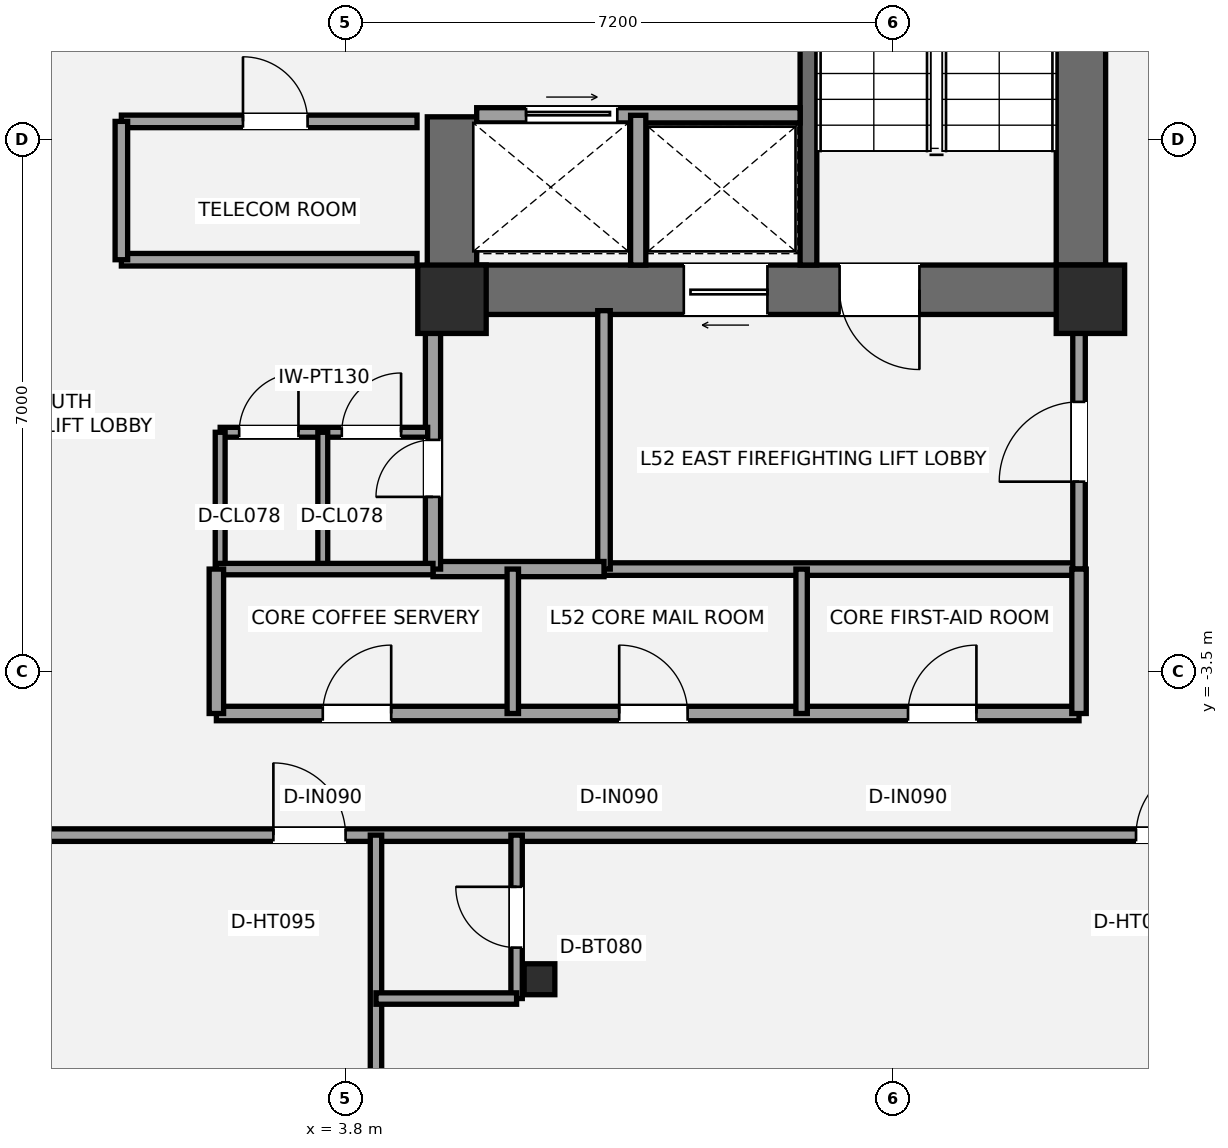
"""IFC4 building model, lengths in metres.
Left out: names, types, materials, properties, quantities, classifications, styles, units other than length and angle.
Written with IfcOpenShell. Run it as: python <this file> out.ifc"""

import sys

from ifc_helpers import new_model, si_unit, direction, frame, frame_2d, origin, origin_2d, place, context, subcontext, project, spatial, rectangle, i_section, extrude, element, fill, save


model = new_model("IFC4")
c1 = context("Model", 3, precision=1e-05, world=origin(), true_north=direction((0.0, 1.0)))
c2 = subcontext(c1, "Body", "Model", "MODEL_VIEW")
j1 = project(units=[si_unit("LENGTHUNIT", "METRE"), si_unit("PLANEANGLEUNIT", "RADIAN")], contexts=[c1])
p1 = place(None, origin())
s1 = spatial("IfcSite", under=j1, at=p1, CompositionType="ELEMENT")
p2 = place(p1, origin())
s2 = spatial("IfcBuilding", under=s1, at=p2, CompositionType="ELEMENT")
p3 = place(p2, frame((0.0, 0.0, 188.6)))
s3 = spatial("IfcBuildingStorey", under=s2, at=p3, CompositionType="ELEMENT", Elevation=188.6)
p4 = place(p3, frame((13.475, 1.2, 0.0), z_axis=(0.0, 0.0, 1.0), x_axis=(0.0, 1.0, 0.0)))
e1 = element("IfcWall", 1, at=p4, inside=s3, PredefinedType="SHEAR", context=c2, shape_type="SweptSolid", body=[
    extrude(rectangle(XDim=8.45, YDim=0.65, at=frame_2d((4.225, 0.0))), origin(), (0.0, 0.0, 1.0), 3.2),
])
p5 = place(p3, frame((13.8, 1.525, 0.0), z_axis=(0.0, 0.0, 1.0), x_axis=(-1.0, 0.0, 0.0)))
e2 = element("IfcWall", 2, at=p5, inside=s3, PredefinedType="SHEAR", context=c2, shape_type="SweptSolid", body=[
    extrude(rectangle(XDim=8.925, YDim=0.65, at=frame_2d((4.462, 0.0))), origin(), (0.0, 0.0, 1.0), 3.2),
])
p6 = place(p5, frame((2.45, 0.0, 0.0)))
e3 = element("IfcOpeningElement", 3, at=p6, cuts=e2, PredefinedType="OPENING", context=c2, shape_type="SweptSolid", body=[
    extrude(rectangle(XDim=1.05, YDim=2.15, at=frame_2d((0.525, 1.075))), frame((0.0, 0.335, 0.0), z_axis=(0.0, -1.0, 0.0), x_axis=(1.0, 0.0, 0.0)), (0.0, 0.0, 1.0), 0.67),
])
p7 = place(p5, frame((4.45, 0.0, 0.0)))
e4 = element("IfcOpeningElement", 4, at=p7, cuts=e2, PredefinedType="OPENING", context=c2, shape_type="SweptSolid", body=[
    extrude(rectangle(XDim=1.1, YDim=2.2, at=frame_2d((0.55, 1.1))), frame((0.0, 0.335, 0.0), z_axis=(0.0, -1.0, 0.0), x_axis=(1.0, 0.0, 0.0)), (0.0, 0.0, 1.0), 0.67),
])
p8 = place(p3, frame((5.2, 1.2, 0.0), z_axis=(0.0, 0.0, 1.0), x_axis=(0.0, 1.0, 0.0)))
e5 = element("IfcWall", 5, at=p8, inside=s3, PredefinedType="SHEAR", context=c2, shape_type="SweptSolid", body=[
    extrude(rectangle(XDim=2.6, YDim=0.65, at=frame_2d((1.3, 0.0))), origin(), (0.0, 0.0, 1.0), 3.2),
])
p9 = place(p3, frame((9.89, 1.85, 0.0), z_axis=(0.0, 0.0, 1.0), x_axis=(0.0, 1.0, 0.0)))
e6 = element("IfcWall", 6, at=p9, inside=s3, PredefinedType="SHEAR", context=c2, shape_type="SweptSolid", body=[
    extrude(rectangle(XDim=7.15, YDim=0.22, at=frame_2d((3.575, 0.0))), origin(), (0.0, 0.0, 1.0), 3.2),
])
for number, where, z_axis, x_axis in (
    (7, (5.2, 1.4, 0.0), (0.0, 0.0, 1.0), (1.0, 0.0, 0.0)),
    (8, (13.6, 1.4, 0.0), (0.0, 0.0, 1.0), (1.0, 0.0, 0.0)),
):
    element("IfcColumn", number, at=place(p3, frame(where, z_axis=z_axis, x_axis=x_axis)), inside=s3, PredefinedType="COLUMN", context=c2, shape_type="SweptSolid", body=[
        extrude(rectangle(XDim=0.9, YDim=0.9, at=origin_2d()), origin(), (0.0, 0.0, 1.0), 3.2),
    ])
p10 = place(p3, frame((6.351, -7.546, 0.0), z_axis=(0.0, 0.0, 1.0), x_axis=(1.0, 0.0, 0.0)))
e9 = element("IfcColumn", 9, at=p10, inside=s3, PredefinedType="COLUMN", context=c2, shape_type="SweptSolid", body=[
    extrude(i_section(OverallWidth=0.404, OverallDepth=0.407, WebThickness=0.027, FlangeThickness=0.044, at=origin_2d()), origin(), (0.0, 0.0, 1.0), 3.2),
])
p11 = place(p3, frame((7.2, -2.15, 0.0), z_axis=(0.0, 0.0, 1.0), x_axis=(1.0, 0.0, 0.0)))
e10 = element("IfcWall", 10, at=p11, inside=s3, PredefinedType="PARTITIONING", context=c2, shape_type="SweptSolid", body=[
    extrude(rectangle(XDim=6.25, YDim=0.165, at=frame_2d((3.125, 0.0))), origin(), (0.0, 0.0, 1.0), 3.02),
])
p12 = place(p3, frame((7.2, -2.15, 0.0), z_axis=(0.0, 0.0, 1.0), x_axis=(0.0, 1.0, 0.0)))
e11 = element("IfcWall", 11, at=p12, inside=s3, PredefinedType="PARTITIONING", context=c2, shape_type="SweptSolid", body=[
    extrude(rectangle(XDim=3.4, YDim=0.165, at=frame_2d((1.7, 0.0))), origin(), (0.0, 0.0, 1.0), 2.473),
])
p13 = place(p3, frame((13.45, -2.15, 0.0), z_axis=(0.0, 0.0, 1.0), x_axis=(0.0, 1.0, 0.0)))
e12 = element("IfcWall", 12, at=p13, inside=s3, PredefinedType="PARTITIONING", context=c2, shape_type="SweptSolid", body=[
    extrude(rectangle(XDim=3.4, YDim=0.165, at=frame_2d((1.7, 0.0))), origin(), (0.0, 0.0, 1.0), 2.473),
])
p14 = place(p13, frame((1.15, 0.0, 0.0)))
e13 = element("IfcOpeningElement", 13, at=p14, cuts=e12, PredefinedType="OPENING", context=c2, shape_type="SweptSolid", body=[
    extrude(rectangle(XDim=1.05, YDim=2.15, at=frame_2d((0.525, 1.075))), frame((0.0, 0.093, 0.0), z_axis=(0.0, -1.0, 0.0), x_axis=(1.0, 0.0, 0.0)), (0.0, 0.0, 1.0), 0.185),
])
p15 = place(p3, frame((4.95, -2.15, 0.0), z_axis=(0.0, 0.0, 1.0), x_axis=(1.0, 0.0, 0.0)))
e14 = element("IfcWall", 14, at=p15, inside=s3, PredefinedType="SOLIDWALL", context=c2, shape_type="SweptSolid", body=[
    extrude(rectangle(XDim=2.25, YDim=0.2, at=frame_2d((1.125, 0.0))), origin(), (0.0, 0.0, 1.0), 3.02),
])
p16 = place(p3, frame((4.95, -2.15, 0.0), z_axis=(0.0, 0.0, 1.0), x_axis=(0.0, 1.0, 0.0)))
e15 = element("IfcWall", 15, at=p16, inside=s3, PredefinedType="SOLIDWALL", context=c2, shape_type="SweptSolid", body=[
    extrude(rectangle(XDim=3.4, YDim=0.2, at=frame_2d((1.7, 0.0))), origin(), (0.0, 0.0, 1.0), 2.473),
])
p17 = place(p16, frame((0.95, 0.0, 0.0)))
e16 = element("IfcOpeningElement", 16, at=p17, cuts=e15, PredefinedType="OPENING", context=c2, shape_type="SweptSolid", body=[
    extrude(rectangle(XDim=0.75, YDim=2.1, at=frame_2d((0.375, 1.05))), frame((0.0, 0.11, 0.0), z_axis=(0.0, -1.0, 0.0), x_axis=(1.0, 0.0, 0.0)), (0.0, 0.0, 1.0), 0.22),
])
p18 = place(p3, frame((2.15, -0.35, 0.0), z_axis=(0.0, 0.0, 1.0), x_axis=(1.0, 0.0, 0.0)))
e17 = element("IfcWall", 17, at=p18, inside=s3, PredefinedType="PARTITIONING", context=c2, shape_type="SweptSolid", body=[
    extrude(rectangle(XDim=2.73, YDim=0.13, at=frame_2d((1.365, 0.0))), origin(), (0.0, 0.0, 1.0), 3.02),
])
p19 = place(p18, frame((0.25, 0.0, 0.0)))
e18 = element("IfcOpeningElement", 18, at=p19, cuts=e17, PredefinedType="OPENING", context=c2, shape_type="SweptSolid", body=[
    extrude(rectangle(XDim=0.78, YDim=2.1, at=frame_2d((0.39, 1.05))), frame((0.0, 0.075, 0.0), z_axis=(0.0, -1.0, 0.0), x_axis=(1.0, 0.0, 0.0)), (0.0, 0.0, 1.0), 0.15),
])
p20 = place(p18, frame((1.6, 0.0, 0.0)))
e19 = element("IfcOpeningElement", 19, at=p20, cuts=e17, PredefinedType="OPENING", context=c2, shape_type="SweptSolid", body=[
    extrude(rectangle(XDim=0.78, YDim=2.1, at=frame_2d((0.39, 1.05))), frame((0.0, 0.075, 0.0), z_axis=(0.0, -1.0, 0.0), x_axis=(1.0, 0.0, 0.0)), (0.0, 0.0, 1.0), 0.15),
])
for number, where, z_axis, x_axis in (
    (20, (2.15, -2.15, 0.0), (0.0, 0.0, 1.0), (0.0, 1.0, 0.0)),
    (21, (3.5, -2.15, 0.0), (0.0, 0.0, 1.0), (0.0, 1.0, 0.0)),
):
    element("IfcWall", number, at=place(p3, frame(where, z_axis=z_axis, x_axis=x_axis)), inside=s3, PredefinedType="PARTITIONING", context=c2, shape_type="SweptSolid", body=[
        extrude(rectangle(XDim=1.8, YDim=0.13, at=frame_2d((0.9, 0.0))), origin(), (0.0, 0.0, 1.0), 3.02),
    ])
p21 = place(p3, frame((5.525, 3.82, 0.0), z_axis=(0.0, 0.0, 1.0), x_axis=(1.0, 0.0, 0.0)))
e22 = element("IfcWall", 22, at=p21, inside=s3, PredefinedType="SOLIDWALL", context=c2, shape_type="SweptSolid", body=[
    extrude(rectangle(XDim=4.255, YDim=0.2, at=frame_2d((2.127, 0.0))), origin(), (0.0, 0.0, 1.0), 3.02),
])
p22 = place(p21, frame((0.65, 0.0, 0.0)))
e23 = element("IfcOpeningElement", 23, at=p22, cuts=e22, PredefinedType="OPENING", context=c2, shape_type="SweptSolid", body=[
    extrude(rectangle(XDim=1.2, YDim=2.2, at=frame_2d((0.6, 1.1))), frame((0.0, 0.11, 0.0), z_axis=(0.0, -1.0, 0.0), x_axis=(1.0, 0.0, 0.0)), (0.0, 0.0, 1.0), 0.22),
])
p23 = place(p3, frame((7.65, 1.85, 0.0), z_axis=(0.0, 0.0, 1.0), x_axis=(0.0, 1.0, 0.0)))
e24 = element("IfcWall", 24, at=p23, inside=s3, PredefinedType="SOLIDWALL", context=c2, shape_type="SweptSolid", body=[
    extrude(rectangle(XDim=1.97, YDim=0.2, at=frame_2d((0.985, 0.0))), origin(), (0.0, 0.0, 1.0), 3.02),
])
p24 = place(p3, frame((0.85, 1.92, 0.0), z_axis=(0.0, 0.0, 1.0), x_axis=(1.0, 0.0, 0.0)))
e25 = element("IfcWall", 25, at=p24, inside=s3, PredefinedType="PARTITIONING", context=c2, shape_type="SweptSolid", body=[
    extrude(rectangle(XDim=3.89, YDim=0.165, at=frame_2d((1.945, 0.0))), origin(), (0.0, 0.0, 1.0), 2.16),
])
p25 = place(p3, frame((0.85, 3.74, 0.0), z_axis=(0.0, 0.0, 1.0), x_axis=(1.0, 0.0, 0.0)))
e26 = element("IfcWall", 26, at=p25, inside=s3, PredefinedType="PARTITIONING", context=c2, shape_type="SweptSolid", body=[
    extrude(rectangle(XDim=3.89, YDim=0.165, at=frame_2d((1.945, 0.0))), origin(), (0.0, 0.0, 1.0), 3.02),
])
p26 = place(p25, frame((1.6, 0.0, 0.0)))
e27 = element("IfcOpeningElement", 27, at=p26, cuts=e26, PredefinedType="OPENING", context=c2, shape_type="SweptSolid", body=[
    extrude(rectangle(XDim=0.85, YDim=2.1, at=frame_2d((0.425, 1.05))), frame((0.0, 0.093, 0.0), z_axis=(0.0, -1.0, 0.0), x_axis=(1.0, 0.0, 0.0)), (0.0, 0.0, 1.0), 0.185),
])
p27 = place(p3, frame((0.85, 1.92, 0.0), z_axis=(0.0, 0.0, 1.0), x_axis=(0.0, 1.0, 0.0)))
e28 = element("IfcWall", 28, at=p27, inside=s3, PredefinedType="PARTITIONING", context=c2, shape_type="SweptSolid", body=[
    extrude(rectangle(XDim=1.82, YDim=0.165, at=frame_2d((0.91, 0.0))), origin(), (0.0, 0.0, 1.0), 3.02),
])
p28 = place(p3, frame((2.1, -4.05, 0.0), z_axis=(0.0, 0.0, 1.0), x_axis=(1.0, 0.0, 0.0)))
e29 = element("IfcWall", 29, at=p28, inside=s3, PredefinedType="PLUMBINGWALL", context=c2, shape_type="SweptSolid", body=[
    extrude(rectangle(XDim=11.35, YDim=0.19, at=frame_2d((5.675, 0.0))), origin(), (0.0, 0.0, 1.0), 2.555),
])
p29 = place(p28, frame((1.4, 0.0, 0.0)))
e30 = element("IfcOpeningElement", 30, at=p29, cuts=e29, PredefinedType="OPENING", context=c2, shape_type="SweptSolid", body=[
    extrude(rectangle(XDim=0.9, YDim=2.1, at=frame_2d((0.45, 1.05))), frame((0.0, 0.105, 0.0), z_axis=(0.0, -1.0, 0.0), x_axis=(1.0, 0.0, 0.0)), (0.0, 0.0, 1.0), 0.21),
])
p30 = place(p28, frame((5.3, 0.0, 0.0)))
e31 = element("IfcOpeningElement", 31, at=p30, cuts=e29, PredefinedType="OPENING", context=c2, shape_type="SweptSolid", body=[
    extrude(rectangle(XDim=0.9, YDim=2.1, at=frame_2d((0.45, 1.05))), frame((0.0, 0.105, 0.0), z_axis=(0.0, -1.0, 0.0), x_axis=(1.0, 0.0, 0.0)), (0.0, 0.0, 1.0), 0.21),
])
p31 = place(p28, frame((9.1, 0.0, 0.0)))
e32 = element("IfcOpeningElement", 32, at=p31, cuts=e29, PredefinedType="OPENING", context=c2, shape_type="SweptSolid", body=[
    extrude(rectangle(XDim=0.9, YDim=2.1, at=frame_2d((0.45, 1.05))), frame((0.0, 0.105, 0.0), z_axis=(0.0, -1.0, 0.0), x_axis=(1.0, 0.0, 0.0)), (0.0, 0.0, 1.0), 0.21),
])
p32 = place(p3, frame((2.1, -2.15, 0.0), z_axis=(0.0, 0.0, 1.0), x_axis=(1.0, 0.0, 0.0)))
e33 = element("IfcWall", 33, at=p32, inside=s3, PredefinedType="PLUMBINGWALL", context=c2, shape_type="SweptSolid", body=[
    extrude(rectangle(XDim=2.85, YDim=0.15, at=frame_2d((1.425, 0.0))), origin(), (0.0, 0.0, 1.0), 3.02),
])
p33 = place(p3, frame((2.1, -4.05, 0.0), z_axis=(0.0, 0.0, 1.0), x_axis=(0.0, 1.0, 0.0)))
e34 = element("IfcWall", 34, at=p33, inside=s3, PredefinedType="PLUMBINGWALL", context=c2, shape_type="SweptSolid", body=[
    extrude(rectangle(XDim=1.9, YDim=0.19, at=frame_2d((0.95, 0.0))), origin(), (0.0, 0.0, 1.0), 3.02),
])
p34 = place(p3, frame((13.45, -4.05, 0.0), z_axis=(0.0, 0.0, 1.0), x_axis=(0.0, 1.0, 0.0)))
e35 = element("IfcWall", 35, at=p34, inside=s3, PredefinedType="PLUMBINGWALL", context=c2, shape_type="SweptSolid", body=[
    extrude(rectangle(XDim=1.9, YDim=0.19, at=frame_2d((0.95, 0.0))), origin(), (0.0, 0.0, 1.0), 2.473),
])
for number, where, z_axis, x_axis in (
    (36, (6.0, -4.05, 0.0), (0.0, 0.0, 1.0), (0.0, 1.0, 0.0)),
    (37, (9.8, -4.05, 0.0), (0.0, 0.0, 1.0), (0.0, 1.0, 0.0)),
):
    element("IfcWall", number, at=place(p3, frame(where, z_axis=z_axis, x_axis=x_axis)), inside=s3, PredefinedType="PLUMBINGWALL", context=c2, shape_type="SweptSolid", body=[
        extrude(rectangle(XDim=1.9, YDim=0.15, at=frame_2d((0.95, 0.0))), origin(), (0.0, 0.0, 1.0), 2.473),
    ])
p35 = place(p3, frame((-16.1, -5.65, 0.0), z_axis=(0.0, 0.0, 1.0), x_axis=(1.0, 0.0, 0.0)))
e38 = element("IfcWall", 38, at=p35, inside=s3, PredefinedType="PARTITIONING", context=c2, shape_type="SweptSolid", body=[
    extrude(rectangle(XDim=31.65, YDim=0.165, at=frame_2d((15.825, 0.0))), origin(), (0.0, 0.0, 1.0), 2.398),
])
p36 = place(p35, frame((8.95, 0.0, 0.0)))
e39 = element("IfcOpeningElement", 39, at=p36, cuts=e38, PredefinedType="OPENING", context=c2, shape_type="SweptSolid", body=[
    extrude(rectangle(XDim=0.95, YDim=2.15, at=frame_2d((0.475, 1.075))), frame((0.0, 0.093, 0.0), z_axis=(0.0, -1.0, 0.0), x_axis=(1.0, 0.0, 0.0)), (0.0, 0.0, 1.0), 0.185),
])
p37 = place(p35, frame((18.95, 0.0, 0.0)))
e40 = element("IfcOpeningElement", 40, at=p37, cuts=e38, PredefinedType="OPENING", context=c2, shape_type="SweptSolid", body=[
    extrude(rectangle(XDim=0.95, YDim=2.15, at=frame_2d((0.475, 1.075))), frame((0.0, 0.093, 0.0), z_axis=(0.0, -1.0, 0.0), x_axis=(1.0, 0.0, 0.0)), (0.0, 0.0, 1.0), 0.185),
])
p38 = place(p35, frame((30.3, 0.0, 0.0)))
e41 = element("IfcOpeningElement", 41, at=p38, cuts=e38, PredefinedType="OPENING", context=c2, shape_type="SweptSolid", body=[
    extrude(rectangle(XDim=0.95, YDim=2.15, at=frame_2d((0.475, 1.075))), frame((0.0, 0.093, 0.0), z_axis=(0.0, -1.0, 0.0), x_axis=(1.0, 0.0, 0.0)), (0.0, 0.0, 1.0), 0.185),
])
p39 = place(p3, frame((4.2, -15.89, 0.0), z_axis=(0.0, 0.0, 1.0), x_axis=(0.0, 1.0, 0.0)))
e42 = element("IfcWall", 42, at=p39, inside=s3, PredefinedType="PLUMBINGWALL", context=c2, shape_type="SweptSolid", body=[
    extrude(rectangle(XDim=10.24, YDim=0.15, at=frame_2d((5.12, 0.0))), origin(), (0.0, 0.0, 1.0), 2.473),
])
p40 = place(p3, frame((6.05, -7.8, 0.0), z_axis=(0.0, 0.0, 1.0), x_axis=(0.0, 1.0, 0.0)))
e43 = element("IfcWall", 43, at=p40, inside=s3, PredefinedType="PLUMBINGWALL", context=c2, shape_type="SweptSolid", body=[
    extrude(rectangle(XDim=2.15, YDim=0.15, at=frame_2d((1.075, 0.0))), origin(), (0.0, 0.0, 1.0), 2.473),
])
p41 = place(p40, frame((0.67, 0.0, 0.0)))
e44 = element("IfcOpeningElement", 44, at=p41, cuts=e43, PredefinedType="OPENING", context=c2, shape_type="SweptSolid", body=[
    extrude(rectangle(XDim=0.8, YDim=2.1, at=frame_2d((0.4, 1.05))), frame((0.0, 0.085, 0.0), z_axis=(0.0, -1.0, 0.0), x_axis=(1.0, 0.0, 0.0)), (0.0, 0.0, 1.0), 0.17),
])
p42 = place(p3, frame((4.2, -7.8, 0.0), z_axis=(0.0, 0.0, 1.0), x_axis=(1.0, 0.0, 0.0)))
e45 = element("IfcWall", 45, at=p42, inside=s3, PredefinedType="PLUMBINGWALL", context=c2, shape_type="SweptSolid", body=[
    extrude(rectangle(XDim=1.85, YDim=0.15, at=frame_2d((0.925, 0.0))), origin(), (0.0, 0.0, 1.0), 3.02),
])
p43 = place(p6, origin())
e46 = element("IfcDoor", 46, at=p43, inside=s3, OperationType="SINGLE_SWING_LEFT", PredefinedType="DOOR", context=c2, shape_type="SweptSolid", body=[
    extrude(rectangle(XDim=1.05, YDim=2.15, at=frame_2d((0.525, 1.075))), frame((0.0, 0.025, 0.0), z_axis=(0.0, -1.0, 0.0), x_axis=(1.0, 0.0, 0.0)), (0.0, 0.0, 1.0), 0.05),
])
fill(e3, e46)
p44 = place(p14, origin())
e47 = element("IfcDoor", 47, at=p44, inside=s3, OperationType="SINGLE_SWING_LEFT", PredefinedType="DOOR", context=c2, shape_type="SweptSolid", body=[
    extrude(rectangle(XDim=1.05, YDim=2.15, at=frame_2d((0.525, 1.075))), frame((0.0, 0.025, 0.0), z_axis=(0.0, -1.0, 0.0), x_axis=(1.0, 0.0, 0.0)), (0.0, 0.0, 1.0), 0.05),
])
fill(e13, e47)
p45 = place(p17, origin())
e48 = element("IfcDoor", 48, at=p45, inside=s3, OperationType="SINGLE_SWING_LEFT", PredefinedType="DOOR", context=c2, shape_type="SweptSolid", body=[
    extrude(rectangle(XDim=0.75, YDim=2.1, at=frame_2d((0.375, 1.05))), frame((0.0, 0.025, 0.0), z_axis=(0.0, -1.0, 0.0), x_axis=(1.0, 0.0, 0.0)), (0.0, 0.0, 1.0), 0.05),
])
fill(e16, e48)
p46 = place(p19, origin())
e49 = element("IfcDoor", 49, at=p46, inside=s3, OperationType="SINGLE_SWING_RIGHT", PredefinedType="DOOR", context=c2, shape_type="SweptSolid", body=[
    extrude(rectangle(XDim=0.78, YDim=2.1, at=frame_2d((0.39, 1.05))), frame((0.0, 0.025, 0.0), z_axis=(0.0, -1.0, 0.0), x_axis=(1.0, 0.0, 0.0)), (0.0, 0.0, 1.0), 0.05),
])
fill(e18, e49)
p47 = place(p20, origin())
e50 = element("IfcDoor", 50, at=p47, inside=s3, OperationType="SINGLE_SWING_RIGHT", PredefinedType="DOOR", context=c2, shape_type="SweptSolid", body=[
    extrude(rectangle(XDim=0.78, YDim=2.1, at=frame_2d((0.39, 1.05))), frame((0.0, 0.025, 0.0), z_axis=(0.0, -1.0, 0.0), x_axis=(1.0, 0.0, 0.0)), (0.0, 0.0, 1.0), 0.05),
])
fill(e19, e50)
p48 = place(p7, origin())
e51 = element("IfcDoor", 51, at=p48, inside=s3, OperationType="SLIDING_TO_LEFT", PredefinedType="DOOR", context=c2, shape_type="SweptSolid", body=[
    extrude(rectangle(XDim=1.1, YDim=2.2, at=frame_2d((0.55, 1.1))), frame((0.0, 0.025, 0.0), z_axis=(0.0, -1.0, 0.0), x_axis=(1.0, 0.0, 0.0)), (0.0, 0.0, 1.0), 0.05),
])
fill(e4, e51)
p49 = place(p22, origin())
e52 = element("IfcDoor", 52, at=p49, inside=s3, OperationType="SLIDING_TO_RIGHT", PredefinedType="DOOR", context=c2, shape_type="SweptSolid", body=[
    extrude(rectangle(XDim=1.2, YDim=2.2, at=frame_2d((0.6, 1.1))), frame((0.0, 0.025, 0.0), z_axis=(0.0, -1.0, 0.0), x_axis=(1.0, 0.0, 0.0)), (0.0, 0.0, 1.0), 0.05),
])
fill(e23, e52)
p50 = place(p26, origin())
e53 = element("IfcDoor", 53, at=p50, inside=s3, OperationType="SINGLE_SWING_LEFT", PredefinedType="DOOR", context=c2, shape_type="SweptSolid", body=[
    extrude(rectangle(XDim=0.85, YDim=2.1, at=frame_2d((0.425, 1.05))), frame((0.0, 0.025, 0.0), z_axis=(0.0, -1.0, 0.0), x_axis=(1.0, 0.0, 0.0)), (0.0, 0.0, 1.0), 0.05),
])
fill(e27, e53)
p51 = place(p29, origin())
e54 = element("IfcDoor", 54, at=p51, inside=s3, OperationType="SINGLE_SWING_RIGHT", PredefinedType="DOOR", context=c2, shape_type="SweptSolid", body=[
    extrude(rectangle(XDim=0.9, YDim=2.1, at=frame_2d((0.45, 1.05))), frame((0.0, 0.025, 0.0), z_axis=(0.0, -1.0, 0.0), x_axis=(1.0, 0.0, 0.0)), (0.0, 0.0, 1.0), 0.05),
])
fill(e30, e54)
p52 = place(p30, origin())
e55 = element("IfcDoor", 55, at=p52, inside=s3, OperationType="SINGLE_SWING_LEFT", PredefinedType="DOOR", context=c2, shape_type="SweptSolid", body=[
    extrude(rectangle(XDim=0.9, YDim=2.1, at=frame_2d((0.45, 1.05))), frame((0.0, 0.025, 0.0), z_axis=(0.0, -1.0, 0.0), x_axis=(1.0, 0.0, 0.0)), (0.0, 0.0, 1.0), 0.05),
])
fill(e31, e55)
p53 = place(p31, origin())
e56 = element("IfcDoor", 56, at=p53, inside=s3, OperationType="SINGLE_SWING_RIGHT", PredefinedType="DOOR", context=c2, shape_type="SweptSolid", body=[
    extrude(rectangle(XDim=0.9, YDim=2.1, at=frame_2d((0.45, 1.05))), frame((0.0, 0.025, 0.0), z_axis=(0.0, -1.0, 0.0), x_axis=(1.0, 0.0, 0.0)), (0.0, 0.0, 1.0), 0.05),
])
fill(e32, e56)
p54 = place(p37, origin())
e57 = element("IfcDoor", 57, at=p54, inside=s3, OperationType="SINGLE_SWING_LEFT", PredefinedType="DOOR", context=c2, shape_type="SweptSolid", body=[
    extrude(rectangle(XDim=0.95, YDim=2.15, at=frame_2d((0.475, 1.075))), frame((0.0, 0.025, 0.0), z_axis=(0.0, -1.0, 0.0), x_axis=(1.0, 0.0, 0.0)), (0.0, 0.0, 1.0), 0.05),
])
fill(e40, e57)
p55 = place(p38, origin())
e58 = element("IfcDoor", 58, at=p55, inside=s3, OperationType="SINGLE_SWING_RIGHT", PredefinedType="DOOR", context=c2, shape_type="SweptSolid", body=[
    extrude(rectangle(XDim=0.95, YDim=2.15, at=frame_2d((0.475, 1.075))), frame((0.0, 0.025, 0.0), z_axis=(0.0, -1.0, 0.0), x_axis=(1.0, 0.0, 0.0)), (0.0, 0.0, 1.0), 0.05),
])
fill(e41, e58)
p56 = place(p41, origin())
e59 = element("IfcDoor", 59, at=p56, inside=s3, OperationType="SINGLE_SWING_RIGHT", PredefinedType="DOOR", context=c2, shape_type="SweptSolid", body=[
    extrude(rectangle(XDim=0.8, YDim=2.1, at=frame_2d((0.4, 1.05))), frame((0.0, 0.025, 0.0), z_axis=(0.0, -1.0, 0.0), x_axis=(1.0, 0.0, 0.0)), (0.0, 0.0, 1.0), 0.05),
])
fill(e44, e59)
save(model, sys.argv[1])
